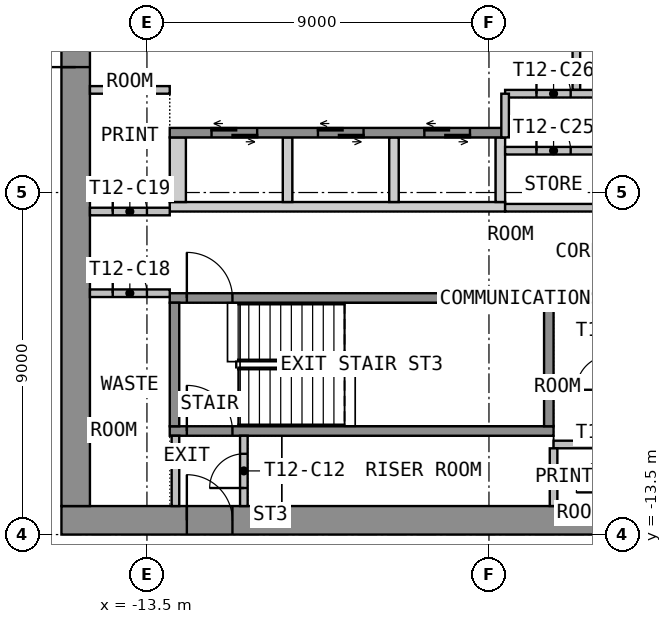
"""IFC4 building model, lengths in metres.
Left out: names, types, materials, properties, quantities, classifications, styles, units other than length and angle.
Written with IfcOpenShell. Run it as: python <this file> out.ifc"""

import sys

from ifc_helpers import new_model, si_unit, direction, frame, frame_2d, origin, place, context, subcontext, project, spatial, polyline, rectangle, outline, extrude, element, fill, save


model = new_model("IFC4")
c1 = context("Model", 3, precision=1e-05, world=origin(), true_north=direction((0.0, 1.0)))
c2 = subcontext(c1, "Body", "Model", "MODEL_VIEW")
j1 = project(units=[si_unit("LENGTHUNIT", "METRE"), si_unit("PLANEANGLEUNIT", "RADIAN")], contexts=[c1])
p1 = place(None, origin())
s1 = spatial("IfcSite", under=j1, at=p1, CompositionType="ELEMENT")
p2 = place(p1, origin())
s2 = spatial("IfcBuilding", under=s1, at=p2, CompositionType="ELEMENT")
p3 = place(p2, frame((0.0, 0.0, 167.7)))
s3 = spatial("IfcBuildingStorey", under=s2, at=p3, CompositionType="ELEMENT", Elevation=167.7)
p4 = place(p3, frame((-15.75, -13.125, 0.0), z_axis=(0.0, 0.0, 1.0), x_axis=(1.0, 0.0, 0.0)))
e1 = element("IfcWall", 1, at=p4, inside=s3, PredefinedType="SHEAR", context=c2, shape_type="SweptSolid", body=[
    extrude(rectangle(XDim=31.5, YDim=0.75, at=frame_2d((15.75, 0.0))), origin(), (0.0, 0.0, 1.0), 3.575),
])
p5 = place(p4, frame((14.55, 0.0, 0.0)))
e2 = element("IfcOpeningElement", 2, at=p5, cuts=e1, PredefinedType="OPENING", context=c2, shape_type="SweptSolid", body=[
    extrude(rectangle(XDim=2.4, YDim=2.1, at=frame_2d((1.2, 1.05))), frame((0.0, 0.385, 0.0), z_axis=(0.0, -1.0, 0.0), x_axis=(1.0, 0.0, 0.0)), (0.0, 0.0, 1.0), 0.77),
])
p6 = place(p4, frame((3.3, 0.0, 0.0)))
e3 = element("IfcOpeningElement", 3, at=p6, cuts=e1, PredefinedType="OPENING", context=c2, shape_type="SweptSolid", body=[
    extrude(rectangle(XDim=1.2, YDim=2.1, at=frame_2d((0.6, 1.05))), frame((0.0, 0.385, 0.0), z_axis=(0.0, -1.0, 0.0), x_axis=(1.0, 0.0, 0.0)), (0.0, 0.0, 1.0), 0.77),
])
p7 = place(p4, frame((27.0, 0.0, 0.0)))
e4 = element("IfcOpeningElement", 4, at=p7, cuts=e1, PredefinedType="OPENING", context=c2, shape_type="SweptSolid", body=[
    extrude(rectangle(XDim=1.2, YDim=2.1, at=frame_2d((0.6, 1.05))), frame((0.0, 0.385, 0.0), z_axis=(0.0, -1.0, 0.0), x_axis=(1.0, 0.0, 0.0)), (0.0, 0.0, 1.0), 0.77),
])
p8 = place(p3, frame((-15.375, -12.75, 0.0), z_axis=(0.0, 0.0, 1.0), x_axis=(0.0, 1.0, 0.0)))
e5 = element("IfcWall", 5, at=p8, inside=s3, PredefinedType="SHEAR", context=c2, shape_type="SweptSolid", body=[
    extrude(rectangle(XDim=25.5, YDim=0.75, at=frame_2d((12.75, 0.0))), origin(), (0.0, 0.0, 1.0), 3.575),
])
p9 = place(p8, frame((11.55, 0.0, 0.0)))
e6 = element("IfcOpeningElement", 6, at=p9, cuts=e5, PredefinedType="OPENING", context=c2, shape_type="SweptSolid", body=[
    extrude(rectangle(XDim=2.4, YDim=2.1, at=frame_2d((1.2, 1.05))), frame((0.0, 0.385, 0.0), z_axis=(0.0, -1.0, 0.0), x_axis=(1.0, 0.0, 0.0)), (0.0, 0.0, 1.0), 0.77),
])
p10 = place(p3, origin())
e7 = element("IfcWall", 7, at=p10, inside=s3, PredefinedType="SHEAR", context=c2, shape_type="SweptSolid", body=[
    extrude(outline(polyline([(-12.9, -5.0), (-4.075, -5.0), (-4.075, -4.75), (-12.9, -4.75), (-12.9, -5.0)])), origin(), (0.0, 0.0, 1.0), 3.575),
])
p11 = place(p3, origin())
e8 = element("IfcWall", 8, at=p11, inside=s3, PredefinedType="SHEAR", context=c2, shape_type="SweptSolid", body=[
    extrude(outline(polyline([(-12.9, -4.75), (-12.475, -4.75), (-12.475, -3.05), (-12.9, -3.05), (-12.9, -4.75)])), origin(), (0.0, 0.0, 1.0), 3.575),
])
p12 = place(p3, origin())
e9 = element("IfcWall", 9, at=p12, inside=s3, PredefinedType="SHEAR", context=c2, shape_type="SweptSolid", body=[
    extrude(outline(polyline([(-9.925, -4.75), (-9.675, -4.75), (-9.675, -3.05), (-9.925, -3.05), (-9.925, -4.75)])), origin(), (0.0, 0.0, 1.0), 3.575),
])
p13 = place(p3, origin())
e10 = element("IfcWall", 10, at=p13, inside=s3, PredefinedType="SHEAR", context=c2, shape_type="SweptSolid", body=[
    extrude(outline(polyline([(-7.125, -4.75), (-6.875, -4.75), (-6.875, -3.05), (-7.125, -3.05), (-7.125, -4.75)])), origin(), (0.0, 0.0, 1.0), 3.575),
])
p14 = place(p3, origin())
e11 = element("IfcWall", 11, at=p14, inside=s3, PredefinedType="SHEAR", context=c2, shape_type="SweptSolid", body=[
    extrude(outline(polyline([(-4.325, -4.75), (-4.075, -4.75), (-4.075, -3.05), (-4.325, -3.05), (-4.325, -4.75)])), origin(), (0.0, 0.0, 1.0), 3.575),
])
p15 = place(p3, frame((-12.9, -2.925, 0.0), z_axis=(0.0, 0.0, 1.0), x_axis=(1.0, 0.0, 0.0)))
e12 = element("IfcWall", 12, at=p15, inside=s3, PredefinedType="SHEAR", context=c2, shape_type="SweptSolid", body=[
    extrude(rectangle(XDim=8.825, YDim=0.25, at=frame_2d((4.413, 0.0))), origin(), (0.0, 0.0, 1.0), 3.575),
])
p16 = place(p15, frame((1.1, 0.0, 0.0)))
e13 = element("IfcOpeningElement", 13, at=p16, cuts=e12, PredefinedType="OPENING", context=c2, shape_type="SweptSolid", body=[
    extrude(rectangle(XDim=1.2, YDim=2.1, at=frame_2d((0.6, 1.05))), frame((0.0, 0.135, 0.0), z_axis=(0.0, -1.0, 0.0), x_axis=(1.0, 0.0, 0.0)), (0.0, 0.0, 1.0), 0.27),
])
p17 = place(p15, frame((3.9, 0.0, 0.0)))
e14 = element("IfcOpeningElement", 14, at=p17, cuts=e12, PredefinedType="OPENING", context=c2, shape_type="SweptSolid", body=[
    extrude(rectangle(XDim=1.2, YDim=2.1, at=frame_2d((0.6, 1.05))), frame((0.0, 0.135, 0.0), z_axis=(0.0, -1.0, 0.0), x_axis=(1.0, 0.0, 0.0)), (0.0, 0.0, 1.0), 0.27),
])
p18 = place(p15, frame((6.7, 0.0, 0.0)))
e15 = element("IfcOpeningElement", 15, at=p18, cuts=e12, PredefinedType="OPENING", context=c2, shape_type="SweptSolid", body=[
    extrude(rectangle(XDim=1.2, YDim=2.1, at=frame_2d((0.6, 1.05))), frame((0.0, 0.135, 0.0), z_axis=(0.0, -1.0, 0.0), x_axis=(1.0, 0.0, 0.0)), (0.0, 0.0, 1.0), 0.27),
])
p19 = place(p3, frame((-2.2, -1.8, 0.0), z_axis=(0.0, 0.0, 1.0), x_axis=(0.0, 1.0, 0.0)))
e16 = element("IfcWall", 16, at=p19, inside=s3, PredefinedType="PARTITIONING", context=c2, shape_type="SweptSolid", body=[
    extrude(rectangle(XDim=3.6, YDim=0.2, at=frame_2d((1.8, 0.0))), origin(), (0.0, 0.0, 1.0), 3.575),
])
p20 = place(p19, frame((1.2, 0.0, 0.0)))
e17 = element("IfcOpeningElement", 17, at=p20, cuts=e16, PredefinedType="OPENING", context=c2, shape_type="SweptSolid", body=[
    extrude(rectangle(XDim=1.2, YDim=2.1, at=frame_2d((0.6, 1.05))), frame((0.0, 0.11, 0.0), z_axis=(0.0, -1.0, 0.0), x_axis=(1.0, 0.0, 0.0)), (0.0, 0.0, 1.0), 0.22),
])
p21 = place(p3, frame((-12.9, -10.775, 0.0), z_axis=(0.0, 0.0, 1.0), x_axis=(1.0, 0.0, 0.0)))
e18 = element("IfcWall", 18, at=p21, inside=s3, PredefinedType="SHEAR", context=c2, shape_type="SweptSolid", body=[
    extrude(rectangle(XDim=10.1, YDim=0.25, at=frame_2d((5.05, 0.0))), origin(), (0.0, 0.0, 1.0), 3.575),
])
p22 = place(p21, frame((0.45, 0.0, 0.0)))
e19 = element("IfcOpeningElement", 19, at=p22, cuts=e18, PredefinedType="OPENING", context=c2, shape_type="SweptSolid", body=[
    extrude(rectangle(XDim=1.2, YDim=2.1, at=frame_2d((0.6, 1.05))), frame((0.0, 0.135, 0.0), z_axis=(0.0, -1.0, 0.0), x_axis=(1.0, 0.0, 0.0)), (0.0, 0.0, 1.0), 0.27),
])
p23 = place(p3, frame((-12.9, -7.275, 0.0), z_axis=(0.0, 0.0, 1.0), x_axis=(1.0, 0.0, 0.0)))
e20 = element("IfcWall", 20, at=p23, inside=s3, PredefinedType="SHEAR", context=c2, shape_type="SweptSolid", body=[
    extrude(rectangle(XDim=10.1, YDim=0.25, at=frame_2d((5.05, 0.0))), origin(), (0.0, 0.0, 1.0), 3.575),
])
p24 = place(p23, frame((0.45, 0.0, 0.0)))
e21 = element("IfcOpeningElement", 21, at=p24, cuts=e20, PredefinedType="OPENING", context=c2, shape_type="SweptSolid", body=[
    extrude(rectangle(XDim=1.2, YDim=2.1, at=frame_2d((0.6, 1.05))), frame((0.0, 0.135, 0.0), z_axis=(0.0, -1.0, 0.0), x_axis=(1.0, 0.0, 0.0)), (0.0, 0.0, 1.0), 0.27),
])
for number, where, z_axis, x_axis in (
    (22, (-12.775, -10.65, 0.0), (0.0, 0.0, 1.0), (0.0, 1.0, 0.0)),
    (23, (-2.925, -10.65, 0.0), (0.0, 0.0, 1.0), (0.0, 1.0, 0.0)),
):
    element("IfcWall", number, at=place(p3, frame(where, z_axis=z_axis, x_axis=x_axis)), inside=s3, PredefinedType="SHEAR", context=c2, shape_type="SweptSolid", body=[
        extrude(rectangle(XDim=3.25, YDim=0.25, at=frame_2d((1.625, 0.0))), origin(), (0.0, 0.0, 1.0), 3.575),
    ])
for number, where, z_axis, x_axis in (
    (24, (-2.8, -7.25, 0.0), (0.0, 0.0, 1.0), (1.0, 0.0, 0.0)),
    (25, (-2.8, -11.13, 0.0), (0.0, 0.0, 1.0), (1.0, 0.0, 0.0)),
):
    element("IfcWall", number, at=place(p3, frame(where, z_axis=z_axis, x_axis=x_axis)), inside=s3, PredefinedType="PARTITIONING", context=c2, shape_type="SweptSolid", body=[
        extrude(rectangle(XDim=1.4, YDim=0.2, at=frame_2d((0.7, 0.0))), origin(), (0.0, 0.0, 1.0), 3.575),
    ])
p25 = place(p3, frame((-12.75, -12.75, 0.0), z_axis=(0.0, 0.0, 1.0), x_axis=(0.0, 1.0, 0.0)))
e26 = element("IfcWall", 26, at=p25, inside=s3, PredefinedType="PARTITIONING", context=c2, shape_type="SweptSolid", body=[
    extrude(rectangle(XDim=1.85, YDim=0.2, at=frame_2d((0.925, 0.0))), origin(), (0.0, 0.0, 1.0), 3.575),
])
p26 = place(p3, frame((-10.95, -12.75, 0.0), z_axis=(0.0, 0.0, 1.0), x_axis=(0.0, 1.0, 0.0)))
e27 = element("IfcWall", 27, at=p26, inside=s3, PredefinedType="PARTITIONING", context=c2, shape_type="SweptSolid", body=[
    extrude(rectangle(XDim=1.85, YDim=0.2, at=frame_2d((0.925, 0.0))), origin(), (0.0, 0.0, 1.0), 3.575),
])
p27 = place(p26, frame((0.475, 0.0, 0.0)))
e28 = element("IfcOpeningElement", 28, at=p27, cuts=e27, PredefinedType="OPENING", context=c2, shape_type="SweptSolid", body=[
    extrude(rectangle(XDim=0.9, YDim=2.1, at=frame_2d((0.45, 1.05))), frame((0.0, 0.11, 0.0), z_axis=(0.0, -1.0, 0.0), x_axis=(1.0, 0.0, 0.0)), (0.0, 0.0, 1.0), 0.22),
])
p28 = place(p3, frame((-15.0, -7.15, 0.0), z_axis=(0.0, 0.0, 1.0), x_axis=(1.0, 0.0, 0.0)))
e29 = element("IfcWall", 29, at=p28, inside=s3, PredefinedType="PARTITIONING", context=c2, shape_type="SweptSolid", body=[
    extrude(rectangle(XDim=2.1, YDim=0.2, at=frame_2d((1.05, 0.0))), origin(), (0.0, 0.0, 1.0), 3.575),
])
p29 = place(p28, frame((0.6, 0.0, 0.0)))
e30 = element("IfcOpeningElement", 30, at=p29, cuts=e29, PredefinedType="OPENING", context=c2, shape_type="SweptSolid", body=[
    extrude(rectangle(XDim=0.9, YDim=2.1, at=frame_2d((0.45, 1.05))), frame((0.0, 0.11, 0.0), z_axis=(0.0, -1.0, 0.0), x_axis=(1.0, 0.0, 0.0)), (0.0, 0.0, 1.0), 0.22),
])
p30 = place(p3, frame((-15.0, -5.0, 0.0), z_axis=(0.0, 0.0, 1.0), x_axis=(1.0, 0.0, 0.0)))
e31 = element("IfcWall", 31, at=p30, inside=s3, PredefinedType="PARTITIONING", context=c2, shape_type="SweptSolid", body=[
    extrude(rectangle(XDim=2.1, YDim=0.2, at=frame_2d((1.05, 0.0))), origin(), (0.0, 0.0, 1.0), 3.575),
])
p31 = place(p30, frame((0.6, 0.0, 0.0)))
e32 = element("IfcOpeningElement", 32, at=p31, cuts=e31, PredefinedType="OPENING", context=c2, shape_type="SweptSolid", body=[
    extrude(rectangle(XDim=0.9, YDim=2.1, at=frame_2d((0.45, 1.05))), frame((0.0, 0.11, 0.0), z_axis=(0.0, -1.0, 0.0), x_axis=(1.0, 0.0, 0.0)), (0.0, 0.0, 1.0), 0.22),
])
p32 = place(p3, frame((-15.0, -1.8, 0.0), z_axis=(0.0, 0.0, 1.0), x_axis=(1.0, 0.0, 0.0)))
e33 = element("IfcWall", 33, at=p32, inside=s3, PredefinedType="PARTITIONING", context=c2, shape_type="SweptSolid", body=[
    extrude(rectangle(XDim=2.1, YDim=0.2, at=frame_2d((1.05, 0.0))), origin(), (0.0, 0.0, 1.0), 3.575),
])
p33 = place(p3, frame((-4.075, -3.4, 0.0), z_axis=(0.0, 0.0, 1.0), x_axis=(1.0, 0.0, 0.0)))
e34 = element("IfcWall", 34, at=p33, inside=s3, PredefinedType="PARTITIONING", context=c2, shape_type="SweptSolid", body=[
    extrude(rectangle(XDim=2.55, YDim=0.2, at=frame_2d((1.275, 0.0))), origin(), (0.0, 0.0, 1.0), 3.575),
])
p34 = place(p33, frame((0.825, 0.0, 0.0)))
e35 = element("IfcOpeningElement", 35, at=p34, cuts=e34, PredefinedType="OPENING", context=c2, shape_type="SweptSolid", body=[
    extrude(rectangle(XDim=0.9, YDim=2.1, at=frame_2d((0.45, 1.05))), frame((0.0, 0.11, 0.0), z_axis=(0.0, -1.0, 0.0), x_axis=(1.0, 0.0, 0.0)), (0.0, 0.0, 1.0), 0.22),
])
p35 = place(p3, frame((-4.075, -1.9, 0.0), z_axis=(0.0, 0.0, 1.0), x_axis=(1.0, 0.0, 0.0)))
e36 = element("IfcWall", 36, at=p35, inside=s3, PredefinedType="PARTITIONING", context=c2, shape_type="SweptSolid", body=[
    extrude(rectangle(XDim=2.55, YDim=0.2, at=frame_2d((1.275, 0.0))), origin(), (0.0, 0.0, 1.0), 3.575),
])
p36 = place(p35, frame((0.825, 0.0, 0.0)))
e37 = element("IfcOpeningElement", 37, at=p36, cuts=e36, PredefinedType="OPENING", context=c2, shape_type="SweptSolid", body=[
    extrude(rectangle(XDim=0.9, YDim=2.1, at=frame_2d((0.45, 1.05))), frame((0.0, 0.11, 0.0), z_axis=(0.0, -1.0, 0.0), x_axis=(1.0, 0.0, 0.0)), (0.0, 0.0, 1.0), 0.22),
])
p37 = place(p3, frame((-4.075, -4.9, 0.0), z_axis=(0.0, 0.0, 1.0), x_axis=(1.0, 0.0, 0.0)))
e38 = element("IfcWall", 38, at=p37, inside=s3, PredefinedType="PARTITIONING", context=c2, shape_type="SweptSolid", body=[
    extrude(rectangle(XDim=2.55, YDim=0.2, at=frame_2d((1.275, 0.0))), origin(), (0.0, 0.0, 1.0), 3.575),
])
p38 = place(p3, frame((-4.075, -1.9, 0.0), z_axis=(0.0, 0.0, 1.0), x_axis=(0.0, -1.0, 0.0)))
e39 = element("IfcWall", 39, at=p38, inside=s3, PredefinedType="PARTITIONING", context=c2, shape_type="SweptSolid", body=[
    extrude(rectangle(XDim=1.15, YDim=0.2, at=frame_2d((0.575, 0.0))), origin(), (0.0, 0.0, 1.0), 3.575),
])
p39 = place(p3, frame((-2.8, -12.749, 0.0), z_axis=(0.0, 0.0, 1.0), x_axis=(0.0, 1.0, 0.0)))
e40 = element("IfcWall", 40, at=p39, inside=s3, PredefinedType="PARTITIONING", context=c2, shape_type="SweptSolid", body=[
    extrude(rectangle(XDim=1.518, YDim=0.2, at=frame_2d((0.759, 0.0))), origin(), (0.0, 0.0, 1.0), 3.575),
])
p40 = place(p9, origin())
e41 = element("IfcDoor", 41, at=p40, inside=s3, OperationType="DOUBLE_DOOR_DOUBLE_SWING", PredefinedType="DOOR", context=c2, shape_type="SweptSolid", body=[
    extrude(rectangle(XDim=2.4, YDim=2.1, at=frame_2d((1.2, 1.05))), frame((0.0, 0.025, 0.0), z_axis=(0.0, -1.0, 0.0), x_axis=(1.0, 0.0, 0.0)), (0.0, 0.0, 1.0), 0.05),
])
fill(e6, e41)
p41 = place(p6, origin())
e42 = element("IfcDoor", 42, at=p41, inside=s3, OperationType="SINGLE_SWING_RIGHT", PredefinedType="DOOR", context=c2, shape_type="SweptSolid", body=[
    extrude(rectangle(XDim=1.2, YDim=2.1, at=frame_2d((0.6, 1.05))), frame((0.0, 0.025, 0.0), z_axis=(0.0, -1.0, 0.0), x_axis=(1.0, 0.0, 0.0)), (0.0, 0.0, 1.0), 0.05),
])
fill(e3, e42)
p42 = place(p16, origin())
e43 = element("IfcDoor", 43, at=p42, inside=s3, OperationType="DOUBLE_DOOR_SLIDING", PredefinedType="DOOR", context=c2, shape_type="SweptSolid", body=[
    extrude(rectangle(XDim=1.2, YDim=2.1, at=frame_2d((0.6, 1.05))), frame((0.0, 0.025, 0.0), z_axis=(0.0, -1.0, 0.0), x_axis=(1.0, 0.0, 0.0)), (0.0, 0.0, 1.0), 0.05),
])
fill(e13, e43)
p43 = place(p17, origin())
e44 = element("IfcDoor", 44, at=p43, inside=s3, OperationType="DOUBLE_DOOR_SLIDING", PredefinedType="DOOR", context=c2, shape_type="SweptSolid", body=[
    extrude(rectangle(XDim=1.2, YDim=2.1, at=frame_2d((0.6, 1.05))), frame((0.0, 0.025, 0.0), z_axis=(0.0, -1.0, 0.0), x_axis=(1.0, 0.0, 0.0)), (0.0, 0.0, 1.0), 0.05),
])
fill(e14, e44)
p44 = place(p18, origin())
e45 = element("IfcDoor", 45, at=p44, inside=s3, OperationType="DOUBLE_DOOR_SLIDING", PredefinedType="DOOR", context=c2, shape_type="SweptSolid", body=[
    extrude(rectangle(XDim=1.2, YDim=2.1, at=frame_2d((0.6, 1.05))), frame((0.0, 0.025, 0.0), z_axis=(0.0, -1.0, 0.0), x_axis=(1.0, 0.0, 0.0)), (0.0, 0.0, 1.0), 0.05),
])
fill(e15, e45)
p45 = place(p24, origin())
e46 = element("IfcDoor", 46, at=p45, inside=s3, OperationType="SINGLE_SWING_LEFT", PredefinedType="DOOR", context=c2, shape_type="SweptSolid", body=[
    extrude(rectangle(XDim=1.2, YDim=2.1, at=frame_2d((0.6, 1.05))), frame((0.0, 0.025, 0.0), z_axis=(0.0, -1.0, 0.0), x_axis=(1.0, 0.0, 0.0)), (0.0, 0.0, 1.0), 0.05),
])
fill(e21, e46)
p46 = place(p22, origin())
e47 = element("IfcDoor", 47, at=p46, inside=s3, OperationType="SINGLE_SWING_RIGHT", PredefinedType="DOOR", context=c2, shape_type="SweptSolid", body=[
    extrude(rectangle(XDim=1.2, YDim=2.1, at=frame_2d((0.6, 1.05))), frame((0.0, 0.025, 0.0), z_axis=(0.0, -1.0, 0.0), x_axis=(1.0, 0.0, 0.0)), (0.0, 0.0, 1.0), 0.05),
])
fill(e19, e47)
p47 = place(p27, origin())
e48 = element("IfcDoor", 48, at=p47, inside=s3, OperationType="SINGLE_SWING_LEFT", PredefinedType="DOOR", context=c2, shape_type="SweptSolid", body=[
    extrude(rectangle(XDim=0.9, YDim=2.1, at=frame_2d((0.45, 1.05))), frame((0.0, 0.025, 0.0), z_axis=(0.0, -1.0, 0.0), x_axis=(1.0, 0.0, 0.0)), (0.0, 0.0, 1.0), 0.05),
])
fill(e28, e48)
p48 = place(p29, origin())
e49 = element("IfcDoor", 49, at=p48, inside=s3, OperationType="SINGLE_SWING_LEFT", PredefinedType="DOOR", context=c2, shape_type="SweptSolid", body=[
    extrude(rectangle(XDim=0.9, YDim=2.1, at=frame_2d((0.45, 1.05))), frame((0.0, 0.025, 0.0), z_axis=(0.0, -1.0, 0.0), x_axis=(1.0, 0.0, 0.0)), (0.0, 0.0, 1.0), 0.05),
])
fill(e30, e49)
p49 = place(p31, origin())
e50 = element("IfcDoor", 50, at=p49, inside=s3, OperationType="SINGLE_SWING_LEFT", PredefinedType="DOOR", context=c2, shape_type="SweptSolid", body=[
    extrude(rectangle(XDim=0.9, YDim=2.1, at=frame_2d((0.45, 1.05))), frame((0.0, 0.025, 0.0), z_axis=(0.0, -1.0, 0.0), x_axis=(1.0, 0.0, 0.0)), (0.0, 0.0, 1.0), 0.05),
])
fill(e32, e50)
p50 = place(p34, origin())
e51 = element("IfcDoor", 51, at=p50, inside=s3, OperationType="SINGLE_SWING_LEFT", PredefinedType="DOOR", context=c2, shape_type="SweptSolid", body=[
    extrude(rectangle(XDim=0.9, YDim=2.1, at=frame_2d((0.45, 1.05))), frame((0.0, 0.025, 0.0), z_axis=(0.0, -1.0, 0.0), x_axis=(1.0, 0.0, 0.0)), (0.0, 0.0, 1.0), 0.05),
])
fill(e35, e51)
p51 = place(p36, origin())
e52 = element("IfcDoor", 52, at=p51, inside=s3, OperationType="SINGLE_SWING_LEFT", PredefinedType="DOOR", context=c2, shape_type="SweptSolid", body=[
    extrude(rectangle(XDim=0.9, YDim=2.1, at=frame_2d((0.45, 1.05))), frame((0.0, 0.025, 0.0), z_axis=(0.0, -1.0, 0.0), x_axis=(1.0, 0.0, 0.0)), (0.0, 0.0, 1.0), 0.05),
])
fill(e37, e52)
save(model, sys.argv[1])
